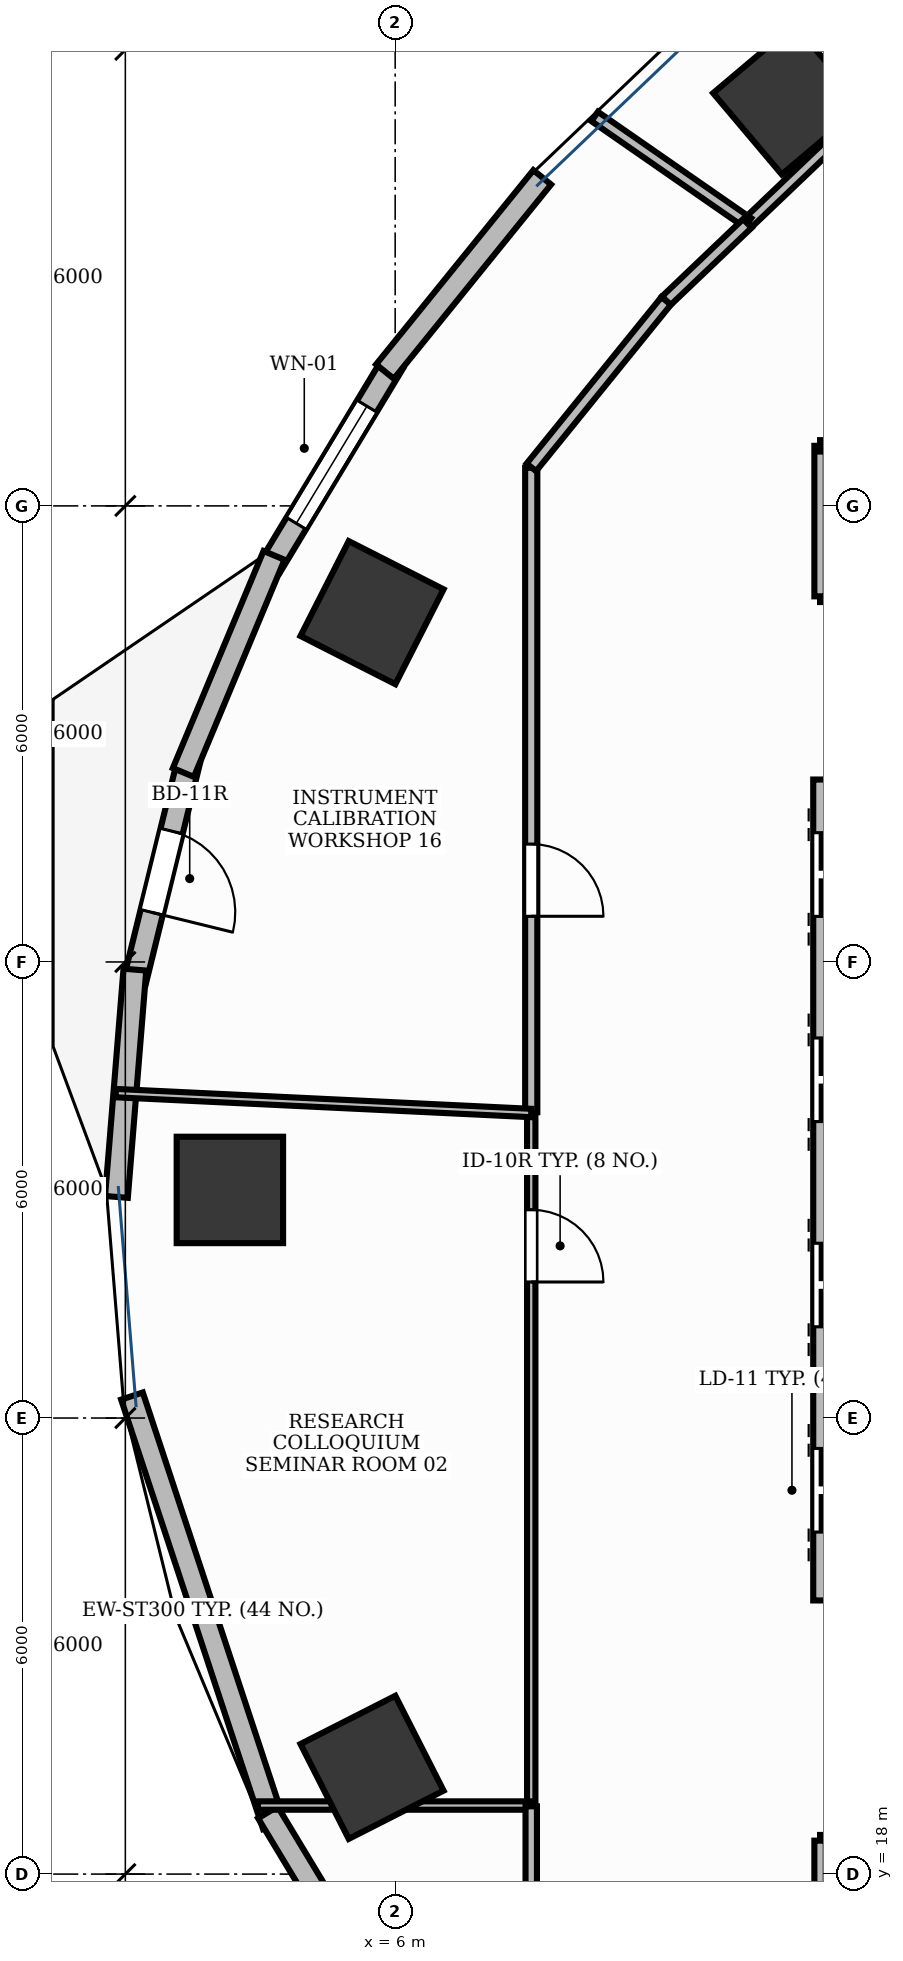
"""IFC4 building model, lengths in metres.
Left out: names, types, materials, properties, quantities, classifications, styles, units other than length and angle.
Written with IfcOpenShell. Run it as: python <this file> out.ifc"""

import sys

from ifc_helpers import new_model, si_unit, direction, frame, frame_2d, origin, origin_2d, place, context, subcontext, project, spatial, rectangle, extrude, element, fill, save


model = new_model("IFC4")
c1 = context("Model", 3, precision=1e-05, world=origin(), true_north=direction((0.0, 1.0)))
c2 = subcontext(c1, "Body", "Model", "MODEL_VIEW")
j1 = project(units=[si_unit("LENGTHUNIT", "METRE"), si_unit("PLANEANGLEUNIT", "RADIAN")], contexts=[c1])
p1 = place(None, origin())
s1 = spatial("IfcSite", under=j1, at=p1, CompositionType="ELEMENT")
p2 = place(p1, origin())
s2 = spatial("IfcBuilding", under=s1, at=p2, CompositionType="ELEMENT")
p3 = place(p2, frame((0.0, 0.0, 25.8)))
s3 = spatial("IfcBuildingStorey", under=s2, at=p3, CompositionType="ELEMENT", Elevation=25.8)
for number, where, z_axis, x_axis in (
    (1, (11.17, 41.347, -0.0), (0.0, 0.0, 1.0), (0.764, 0.645, 0.0)),
    (2, (5.696, 34.596, -0.0), (0.0, 0.0, 1.0), (0.453, 0.891, 0.0)),
    (3, (3.825, 27.001, -0.0), (0.0, 0.0, 1.0), (0.0, 1.0, 0.0)),
    (4, (5.696, 19.404, -0.0), (0.0, 0.0, 1.0), (-0.453, 0.891, 0.0)),
):
    element("IfcColumn", number, at=place(p3, frame(where, z_axis=z_axis, x_axis=x_axis)), inside=s3, PredefinedType="COLUMN", context=c2, shape_type="SweptSolid", body=[
        extrude(rectangle(XDim=1.4, YDim=1.4, at=origin_2d()), origin(), (0.0, 0.0, 1.0), 3.901),
    ])
p4 = place(p3, frame((5.975, 37.886, 0.0), z_axis=(0.0, 0.0, 1.0), x_axis=(-0.516447962267, -0.856318575222, 0.0)))
e5 = element("IfcWall", 5, at=p4, inside=s3, PredefinedType="STANDARD", context=c2, shape_type="SweptSolid", body=[
    extrude(rectangle(XDim=3.143, YDim=0.3, at=frame_2d((1.571, 0.0))), origin(), (0.0, 0.0, 1.0), 3.47),
])
p5 = place(p4, frame((0.671, 0.0, 0.9)))
e6 = element("IfcOpeningElement", 6, at=p5, cuts=e5, PredefinedType="OPENING", context=c2, shape_type="SweptSolid", body=[
    extrude(rectangle(XDim=1.8, YDim=2.1, at=frame_2d((0.9, 1.05))), frame((0.0, 0.165, 0.0), z_axis=(0.0, -1.0, 0.0), x_axis=(1.0, 0.0, 0.0)), (0.0, 0.0, 1.0), 0.33),
])
p6 = place(p3, frame((3.285, 32.641, 0.0), z_axis=(0.0, 0.0, 1.0), x_axis=(-0.238522035896, -0.971137085273, 0.0)))
e7 = element("IfcWall", 7, at=p6, inside=s3, PredefinedType="STANDARD", context=c2, shape_type="SweptSolid", body=[
    extrude(rectangle(XDim=2.993, YDim=0.3, at=frame_2d((1.497, 0.0))), origin(), (0.0, 0.0, 1.0), 3.9),
])
p7 = place(p6, frame((0.946, 0.0, 0.0)))
e8 = element("IfcOpeningElement", 8, at=p7, cuts=e7, PredefinedType="OPENING", context=c2, shape_type="SweptSolid", body=[
    extrude(rectangle(XDim=1.1, YDim=2.15, at=frame_2d((0.55, 1.075))), frame((0.0, 0.165, 0.0), z_axis=(0.0, -1.0, 0.0), x_axis=(1.0, 0.0, 0.0)), (0.0, 0.0, 1.0), 0.33),
])
p8 = place(p3, frame((7.934, 40.323, 0.0), z_axis=(0.0, 0.0, 1.0), x_axis=(-0.629221727718, -0.777225847079, 0.0)))
e9 = element("IfcWall", 9, at=p8, inside=s3, PredefinedType="STANDARD", context=c2, shape_type="SweptSolid", body=[
    extrude(rectangle(XDim=3.288, YDim=0.3, at=frame_2d((1.644, 0.0))), origin(), (0.0, 0.0, 1.0), 3.47),
])
p9 = place(p3, frame((4.406, 35.349, 0.0), z_axis=(0.0, 0.0, 1.0), x_axis=(-0.38535448421, -0.922768617531, 0.0)))
e10 = element("IfcWall", 10, at=p9, inside=s3, PredefinedType="STANDARD", context=c2, shape_type="SweptSolid", body=[
    extrude(rectangle(XDim=3.095, YDim=0.3, at=frame_2d((1.548, 0.0))), origin(), (0.0, 0.0, 1.0), 3.9),
])
p10 = place(p3, frame((2.576, 29.899, 0.0), z_axis=(0.0, 0.0, 1.0), x_axis=(-0.080890160317, -0.996723021689, 0.0)))
e11 = element("IfcWall", 11, at=p10, inside=s3, PredefinedType="STANDARD", context=c2, shape_type="SweptSolid", body=[
    extrude(rectangle(XDim=3.0, YDim=0.3, at=frame_2d((1.5, 0.0))), origin(), (0.0, 0.0, 1.0), 3.9),
])
p11 = place(p3, frame((2.537, 24.289, 0.0), z_axis=(0.0, 0.0, 1.0), x_axis=(0.31372816724, -0.949512841978, 0.0)))
e12 = element("IfcWall", 12, at=p11, inside=s3, PredefinedType="STANDARD", context=c2, shape_type="SweptSolid", body=[
    extrude(rectangle(XDim=5.951, YDim=0.3, at=frame_2d((2.976, 0.0))), origin(), (0.0, 0.0, 1.0), 3.9),
])
p12 = place(p3, frame((4.325, 18.812, 0.0), z_axis=(0.0, 0.0, 1.0), x_axis=(0.516423528484, -0.856333310825, 0.0)))
e13 = element("IfcWall", 13, at=p12, inside=s3, PredefinedType="STANDARD", context=c2, shape_type="SweptSolid", body=[
    extrude(rectangle(XDim=3.183, YDim=0.3, at=frame_2d((1.591, 0.0))), origin(), (0.0, 0.0, 1.0), 3.47),
])
p13 = place(p3, frame((11.6, 21.6, 0.0), z_axis=(0.0, 0.0, 1.0), x_axis=(0.0, 1.0, 0.0)))
e14 = element("IfcWall", 14, at=p13, inside=s3, PredefinedType="PARTITIONING", context=c2, shape_type="SweptSolid", body=[
    extrude(rectangle(XDim=10.8, YDim=0.2, at=frame_2d((5.4, 0.0))), origin(), (0.0, 0.0, 1.0), 2.91),
])
p14 = place(p13, frame((0.9, 0.0, 0.0)))
e15 = element("IfcOpeningElement", 15, at=p14, cuts=e14, PredefinedType="OPENING", context=c2, shape_type="SweptSolid", body=[
    extrude(rectangle(XDim=1.1, YDim=2.2, at=frame_2d((0.55, 1.1))), frame((0.0, 0.115, 0.0), z_axis=(0.0, -1.0, 0.0), x_axis=(1.0, 0.0, 0.0)), (0.0, 0.0, 1.0), 0.23),
])
p15 = place(p13, frame((3.6, 0.0, 0.0)))
e16 = element("IfcOpeningElement", 16, at=p15, cuts=e14, PredefinedType="OPENING", context=c2, shape_type="SweptSolid", body=[
    extrude(rectangle(XDim=1.1, YDim=2.2, at=frame_2d((0.55, 1.1))), frame((0.0, 0.115, 0.0), z_axis=(0.0, -1.0, 0.0), x_axis=(1.0, 0.0, 0.0)), (0.0, 0.0, 1.0), 0.23),
])
p16 = place(p13, frame((6.3, 0.0, 0.0)))
e17 = element("IfcOpeningElement", 17, at=p16, cuts=e14, PredefinedType="OPENING", context=c2, shape_type="SweptSolid", body=[
    extrude(rectangle(XDim=1.1, YDim=2.2, at=frame_2d((0.55, 1.1))), frame((0.0, 0.115, 0.0), z_axis=(0.0, -1.0, 0.0), x_axis=(1.0, 0.0, 0.0)), (0.0, 0.0, 1.0), 0.23),
])
p17 = place(p13, frame((9.0, 0.0, 0.0)))
e18 = element("IfcOpeningElement", 18, at=p17, cuts=e14, PredefinedType="OPENING", context=c2, shape_type="SweptSolid", body=[
    extrude(rectangle(XDim=1.1, YDim=2.2, at=frame_2d((0.55, 1.1))), frame((0.0, 0.115, 0.0), z_axis=(0.0, -1.0, 0.0), x_axis=(1.0, 0.0, 0.0)), (0.0, 0.0, 1.0), 0.23),
])
p18 = place(p3, frame((7.79, 28.013, 0.0), z_axis=(0.0, 0.0, 1.0), x_axis=(0.0, -1.0, 0.0)))
e19 = element("IfcWall", 19, at=p18, inside=s3, PredefinedType="MOVABLE", context=c2, shape_type="SweptSolid", body=[
    extrude(rectangle(XDim=9.111, YDim=0.11, at=frame_2d((4.555, 0.0))), origin(), (0.0, 0.0, 1.0), 2.91),
])
p19 = place(p18, frame((1.273, 0.0, 0.0)))
e20 = element("IfcOpeningElement", 20, at=p19, cuts=e19, PredefinedType="OPENING", context=c2, shape_type="SweptSolid", body=[
    extrude(rectangle(XDim=0.95, YDim=2.15, at=frame_2d((0.475, 1.075))), frame((0.0, 0.07, 0.0), z_axis=(0.0, -1.0, 0.0), x_axis=(1.0, 0.0, 0.0)), (0.0, 0.0, 1.0), 0.14),
])
p20 = place(p3, frame((11.59, 18.44, 0.0), z_axis=(0.0, 0.0, 1.0), x_axis=(1.0, 0.0, 0.0)))
e21 = element("IfcWall", 21, at=p20, inside=s3, PredefinedType="PARTITIONING", context=c2, shape_type="SweptSolid", body=[
    extrude(rectangle(XDim=5.411, YDim=0.15, at=frame_2d((2.706, 0.0))), origin(), (0.0, 0.0, 1.0), 2.91),
])
p21 = place(p20, frame((0.24, 0.0, 0.0)))
e22 = element("IfcOpeningElement", 22, at=p21, cuts=e21, PredefinedType="OPENING", context=c2, shape_type="SweptSolid", body=[
    extrude(rectangle(XDim=0.95, YDim=2.15, at=frame_2d((0.475, 1.075))), frame((0.0, 0.09, 0.0), z_axis=(0.0, -1.0, 0.0), x_axis=(1.0, 0.0, 0.0)), (0.0, 0.0, 1.0), 0.18),
])
p22 = place(p3, frame((21.74, 34.81, 0.0), z_axis=(0.0, 0.0, 1.0), x_axis=(-1.0, 0.0, 0.0)))
e23 = element("IfcWall", 23, at=p22, inside=s3, PredefinedType="PARTITIONING", context=c2, shape_type="SweptSolid", body=[
    extrude(rectangle(XDim=10.15, YDim=0.15, at=frame_2d((5.075, 0.0))), origin(), (0.0, 0.0, 1.0), 2.91),
])
p23 = place(p22, frame((8.96, 0.0, 0.0)))
e24 = element("IfcOpeningElement", 24, at=p23, cuts=e23, PredefinedType="OPENING", context=c2, shape_type="SweptSolid", body=[
    extrude(rectangle(XDim=0.95, YDim=2.15, at=frame_2d((0.475, 1.075))), frame((0.0, 0.09, 0.0), z_axis=(0.0, -1.0, 0.0), x_axis=(1.0, 0.0, 0.0)), (0.0, 0.0, 1.0), 0.18),
])
p24 = place(p3, frame((7.79, 36.501, 0.0), z_axis=(0.0, 0.0, 1.0), x_axis=(0.0, -1.0, 0.0)))
e25 = element("IfcWall", 25, at=p24, inside=s3, PredefinedType="PARTITIONING", context=c2, shape_type="SweptSolid", body=[
    extrude(rectangle(XDim=8.478, YDim=0.16, at=frame_2d((4.239, 0.0))), origin(), (0.0, 0.0, 1.0), 2.91),
])
p25 = place(p24, frame((4.95, 0.0, 0.0)))
e26 = element("IfcOpeningElement", 26, at=p25, cuts=e25, PredefinedType="OPENING", context=c2, shape_type="SweptSolid", body=[
    extrude(rectangle(XDim=0.95, YDim=2.15, at=frame_2d((0.475, 1.075))), frame((0.0, 0.095, 0.0), z_axis=(0.0, -1.0, 0.0), x_axis=(1.0, 0.0, 0.0)), (0.0, 0.0, 1.0), 0.19),
])
p26 = place(p3, frame((2.323, 28.275, 0.0), z_axis=(0.0, 0.0, 1.0), x_axis=(0.998855892644, -0.047821603185, 0.0)))
e27 = element("IfcWall", 27, at=p26, inside=s3, PredefinedType="MOVABLE", context=c2, shape_type="SweptSolid", body=[
    extrude(rectangle(XDim=5.473, YDim=0.11, at=frame_2d((2.736, 0.0))), origin(), (0.0, 0.0, 1.0), 2.91),
])
p27 = place(p3, frame((7.79, 18.902, 0.0), z_axis=(0.0, 0.0, 1.0), x_axis=(-1.0, 0.0, 0.0)))
e28 = element("IfcWall", 28, at=p27, inside=s3, PredefinedType="MOVABLE", context=c2, shape_type="SweptSolid", body=[
    extrude(rectangle(XDim=3.596, YDim=0.11, at=frame_2d((1.798, 0.0))), origin(), (0.0, 0.0, 1.0), 2.91),
])
p28 = place(p3, frame((7.79, 18.892, 0.0), z_axis=(0.0, 0.0, 1.0), x_axis=(0.0, -1.0, 0.0)))
e29 = element("IfcWall", 29, at=p28, inside=s3, PredefinedType="PARTITIONING", context=c2, shape_type="SweptSolid", body=[
    extrude(rectangle(XDim=1.393, YDim=0.15, at=frame_2d((0.697, 0.0))), origin(), (0.0, 0.0, 1.0), 2.91),
])
p29 = place(p3, frame((11.59, 16.5, 0.0), z_axis=(0.0, 0.0, 1.0), x_axis=(0.0, 1.0, 0.0)))
e30 = element("IfcWall", 30, at=p29, inside=s3, PredefinedType="PARTITIONING", context=c2, shape_type="SweptSolid", body=[
    extrude(rectangle(XDim=1.94, YDim=0.15, at=frame_2d((0.97, 0.0))), origin(), (0.0, 0.0, 1.0), 2.91),
])
p30 = place(p3, frame((17.001, 18.44, 0.0), z_axis=(0.0, 0.0, 1.0), x_axis=(-0.813397935838, -0.581707656796, 0.0)))
e31 = element("IfcWall", 31, at=p30, inside=s3, PredefinedType="PARTITIONING", context=c2, shape_type="SweptSolid", body=[
    extrude(rectangle(XDim=9.984, YDim=0.15, at=frame_2d((4.992, 0.0))), origin(), (0.0, 0.0, 1.0), 2.91),
])
p31 = place(p3, frame((11.693, 40.727, 0.0), z_axis=(0.0, 0.0, 1.0), x_axis=(-0.723614682185, -0.690204166697, 0.0)))
e32 = element("IfcWall", 32, at=p31, inside=s3, PredefinedType="PARTITIONING", context=c2, shape_type="SweptSolid", body=[
    extrude(rectangle(XDim=1.454, YDim=0.15, at=frame_2d((0.727, 0.0))), origin(), (0.0, 0.0, 1.0), 2.91),
])
p32 = place(p3, frame((10.641, 39.723, 0.0), z_axis=(0.0, 0.0, 1.0), x_axis=(-0.821561492386, 0.570119912149, 0.0)))
e33 = element("IfcWall", 33, at=p32, inside=s3, PredefinedType="PARTITIONING", context=c2, shape_type="SweptSolid", body=[
    extrude(rectangle(XDim=2.455, YDim=0.15, at=frame_2d((1.227, 0.0))), origin(), (0.0, 0.0, 1.0), 2.91),
])
p33 = place(p3, frame((11.59, 34.81, 0.0), z_axis=(0.0, 0.0, 1.0), x_axis=(0.0, 1.0, 0.0)))
e34 = element("IfcWall", 34, at=p33, inside=s3, PredefinedType="PARTITIONING", context=c2, shape_type="SweptSolid", body=[
    extrude(rectangle(XDim=1.98, YDim=0.15, at=frame_2d((0.99, 0.0))), origin(), (0.0, 0.0, 1.0), 2.91),
])
p34 = place(p3, frame((11.59, 36.79, 0.0), z_axis=(0.0, 0.0, 1.0), x_axis=(1.0, 0.0, 0.0)))
e35 = element("IfcWall", 35, at=p34, inside=s3, PredefinedType="PARTITIONING", context=c2, shape_type="SweptSolid", body=[
    extrude(rectangle(XDim=5.21, YDim=0.15, at=frame_2d((2.605, 0.0))), origin(), (0.0, 0.0, 1.0), 2.91),
])
p35 = place(p3, frame((10.634, 39.717, 0.0), z_axis=(0.0, 0.0, 1.0), x_axis=(-0.723701031319, -0.690113626345, 0.0)))
e36 = element("IfcWall", 36, at=p35, inside=s3, PredefinedType="PARTITIONING", context=c2, shape_type="SweptSolid", body=[
    extrude(rectangle(XDim=1.476, YDim=0.16, at=frame_2d((0.738, 0.0))), origin(), (0.0, 0.0, 1.0), 2.91),
])
p36 = place(p3, frame((9.565, 38.697, 0.0), z_axis=(0.0, 0.0, 1.0), x_axis=(-0.629270515505, -0.777186347227, 0.0)))
e37 = element("IfcWall", 37, at=p36, inside=s3, PredefinedType="PARTITIONING", context=c2, shape_type="SweptSolid", body=[
    extrude(rectangle(XDim=2.817, YDim=0.16, at=frame_2d((1.409, 0.0))), origin(), (0.0, 0.0, 1.0), 2.91),
])
p37 = place(p5, origin())
e38 = element("IfcWindow", 38, at=p37, inside=s3, PartitioningType="SINGLE_PANEL", PredefinedType="WINDOW", context=c2, shape_type="SweptSolid", body=[
    extrude(rectangle(XDim=1.8, YDim=2.1, at=frame_2d((0.9, 1.05))), frame((0.0, 0.03, 0.0), z_axis=(0.0, -1.0, 0.0), x_axis=(1.0, 0.0, 0.0)), (0.0, 0.0, 1.0), 0.06),
])
fill(e6, e38)
p38 = place(p7, origin())
e39 = element("IfcDoor", 39, at=p38, inside=s3, OperationType="SINGLE_SWING_RIGHT", PredefinedType="DOOR", context=c2, shape_type="SweptSolid", body=[
    extrude(rectangle(XDim=1.1, YDim=2.15, at=frame_2d((0.55, 1.075))), frame((0.0, 0.025, 0.0), z_axis=(0.0, -1.0, 0.0), x_axis=(1.0, 0.0, 0.0)), (0.0, 0.0, 1.0), 0.05),
])
fill(e8, e39)
p39 = place(p14, origin())
e40 = element("IfcDoor", 40, at=p39, inside=s3, OperationType="DOUBLE_DOOR_SLIDING", PredefinedType="DOOR", context=c2, shape_type="SweptSolid", body=[
    extrude(rectangle(XDim=1.1, YDim=2.2, at=frame_2d((0.55, 1.1))), frame((0.0, 0.025, 0.0), z_axis=(0.0, -1.0, 0.0), x_axis=(1.0, 0.0, 0.0)), (0.0, 0.0, 1.0), 0.05),
])
fill(e15, e40)
p40 = place(p15, origin())
e41 = element("IfcDoor", 41, at=p40, inside=s3, OperationType="DOUBLE_DOOR_SLIDING", PredefinedType="DOOR", context=c2, shape_type="SweptSolid", body=[
    extrude(rectangle(XDim=1.1, YDim=2.2, at=frame_2d((0.55, 1.1))), frame((0.0, 0.025, 0.0), z_axis=(0.0, -1.0, 0.0), x_axis=(1.0, 0.0, 0.0)), (0.0, 0.0, 1.0), 0.05),
])
fill(e16, e41)
p41 = place(p16, origin())
e42 = element("IfcDoor", 42, at=p41, inside=s3, OperationType="DOUBLE_DOOR_SLIDING", PredefinedType="DOOR", context=c2, shape_type="SweptSolid", body=[
    extrude(rectangle(XDim=1.1, YDim=2.2, at=frame_2d((0.55, 1.1))), frame((0.0, 0.025, 0.0), z_axis=(0.0, -1.0, 0.0), x_axis=(1.0, 0.0, 0.0)), (0.0, 0.0, 1.0), 0.05),
])
fill(e17, e42)
p42 = place(p17, origin())
e43 = element("IfcDoor", 43, at=p42, inside=s3, OperationType="DOUBLE_DOOR_SLIDING", PredefinedType="DOOR", context=c2, shape_type="SweptSolid", body=[
    extrude(rectangle(XDim=1.1, YDim=2.2, at=frame_2d((0.55, 1.1))), frame((0.0, 0.025, 0.0), z_axis=(0.0, -1.0, 0.0), x_axis=(1.0, 0.0, 0.0)), (0.0, 0.0, 1.0), 0.05),
])
fill(e18, e43)
p43 = place(p19, origin())
e44 = element("IfcDoor", 44, at=p43, inside=s3, OperationType="SINGLE_SWING_RIGHT", PredefinedType="DOOR", context=c2, shape_type="SweptSolid", body=[
    extrude(rectangle(XDim=0.95, YDim=2.15, at=frame_2d((0.475, 1.075))), frame((0.0, 0.025, 0.0), z_axis=(0.0, -1.0, 0.0), x_axis=(1.0, 0.0, 0.0)), (0.0, 0.0, 1.0), 0.05),
])
fill(e20, e44)
p44 = place(p25, origin())
e45 = element("IfcDoor", 45, at=p44, inside=s3, OperationType="SINGLE_SWING_RIGHT", PredefinedType="DOOR", context=c2, shape_type="SweptSolid", body=[
    extrude(rectangle(XDim=0.95, YDim=2.15, at=frame_2d((0.475, 1.075))), frame((0.0, 0.025, 0.0), z_axis=(0.0, -1.0, 0.0), x_axis=(1.0, 0.0, 0.0)), (0.0, 0.0, 1.0), 0.05),
])
fill(e26, e45)
save(model, sys.argv[1])
